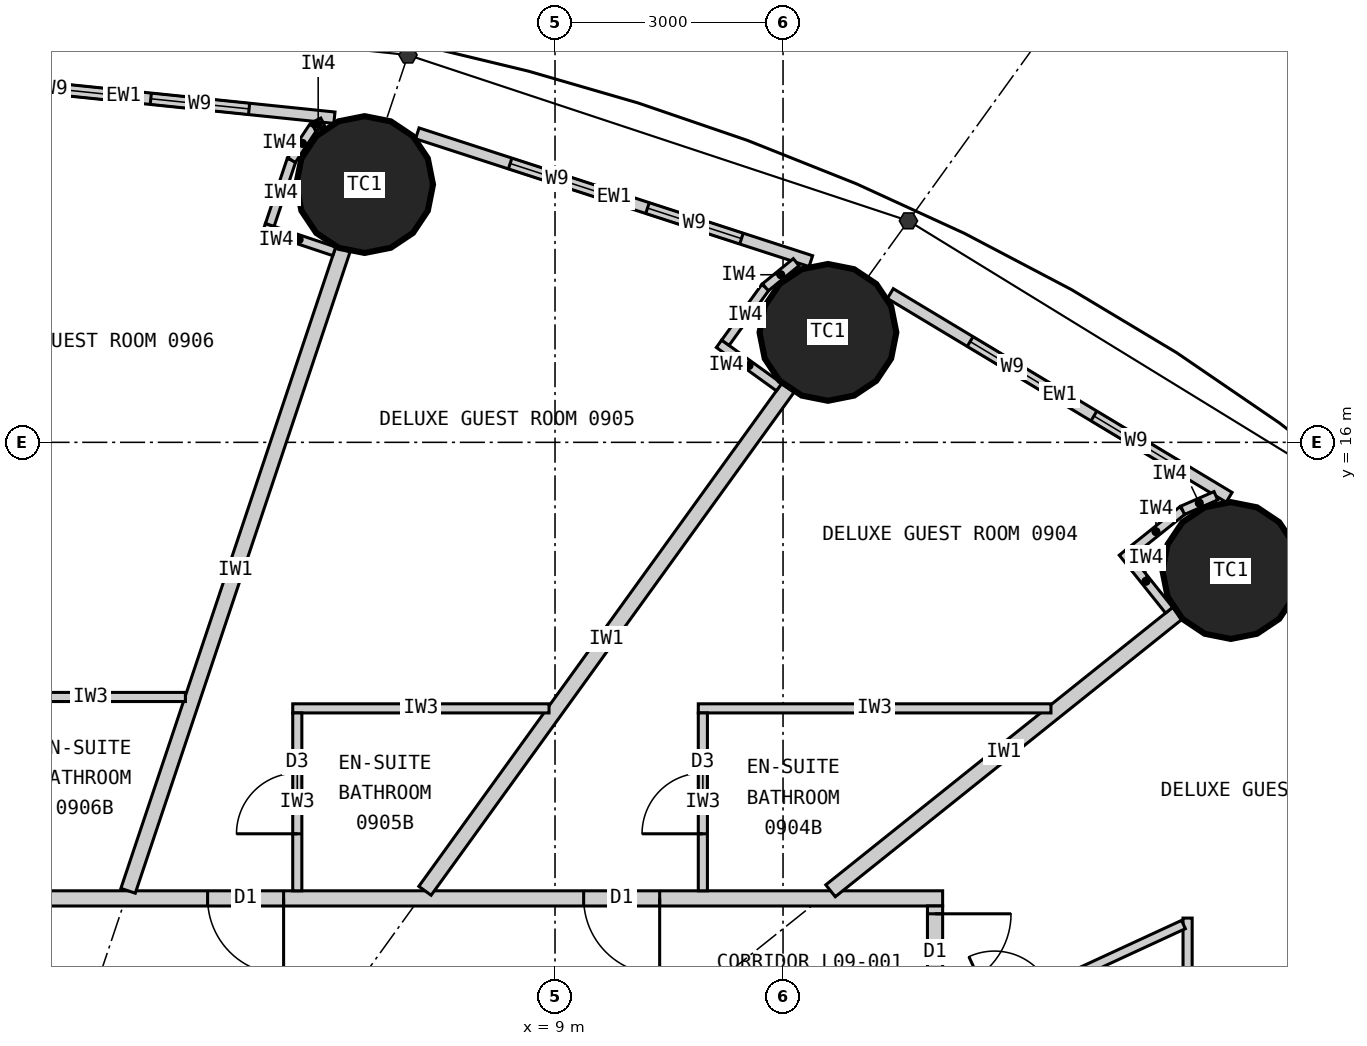
"""IFC4 building model, lengths in metres.
Left out: names, types, materials, properties, quantities, classifications, styles, units other than length and angle.
Written with IfcOpenShell. Run it as: python <this file> out.ifc"""

import sys

from ifc_helpers import new_model, si_unit, direction, frame, frame_2d, origin, origin_2d, place, context, subcontext, project, spatial, rectangle, circle, extrude, element, fill, save


model = new_model("IFC4")
c1 = context("Model", 3, precision=1e-05, world=origin(), true_north=direction((0.0, 1.0)))
c2 = subcontext(c1, "Body", "Model", "MODEL_VIEW")
j1 = project(units=[si_unit("LENGTHUNIT", "METRE"), si_unit("PLANEANGLEUNIT", "RADIAN")], contexts=[c1])
p1 = place(None, origin())
s1 = spatial("IfcSite", under=j1, at=p1, CompositionType="ELEMENT")
p2 = place(p1, origin())
s2 = spatial("IfcBuilding", under=s1, at=p2, CompositionType="ELEMENT")
p3 = place(p2, frame((0.0, 0.0, 42.6)))
s3 = spatial("IfcBuildingStorey", under=s2, at=p3, CompositionType="ELEMENT", Elevation=42.6)
for number, where, z_axis, x_axis in (
    (1, (17.892, 14.313, 0.0), (0.0, 0.0, 1.0), (1.0, 0.0, 0.0)),
    (2, (12.591, 17.447, 0.0), (0.0, 0.0, 1.0), (1.0, 0.0, 0.0)),
    (3, (6.495, 19.391, 0.0), (0.0, 0.0, 1.0), (1.0, 0.0, 0.0)),
):
    element("IfcColumn", number, at=place(p3, frame(where, z_axis=z_axis, x_axis=x_axis)), inside=s3, PredefinedType="COLUMN", context=c2, shape_type="SweptSolid", body=[
        extrude(circle(Radius=0.9, at=origin_2d()), origin(), (0.0, 0.0, 1.0), 3.3),
    ])
p4 = place(p3, frame((17.869, 15.277, 0.0), z_axis=(0.0, 0.0, 1.0), x_axis=(-0.856958191554, 0.515385931054, 0.0)))
e4 = element("IfcWall", 4, at=p4, inside=s3, PredefinedType="ELEMENTEDWALL", context=c2, shape_type="SweptSolid", body=[
    extrude(rectangle(XDim=5.201, YDim=0.15, at=frame_2d((2.601, 0.0))), origin(), (0.0, 0.0, 1.0), 3.05),
])
p5 = place(p4, frame((0.776, 0.0, 0.9)))
e5 = element("IfcOpeningElement", 5, at=p5, cuts=e4, PredefinedType="OPENING", context=c2, shape_type="SweptSolid", body=[
    extrude(rectangle(XDim=1.3, YDim=1.9, at=frame_2d((0.65, 0.95))), frame((0.0, 0.085, 0.0), z_axis=(0.0, -1.0, 0.0), x_axis=(1.0, 0.0, 0.0)), (0.0, 0.0, 1.0), 0.17),
])
p6 = place(p4, frame((2.676, 0.0, 0.9)))
e6 = element("IfcOpeningElement", 6, at=p6, cuts=e4, PredefinedType="OPENING", context=c2, shape_type="SweptSolid", body=[
    extrude(rectangle(XDim=1.3, YDim=1.9, at=frame_2d((0.65, 0.95))), frame((0.0, 0.085, 0.0), z_axis=(0.0, -1.0, 0.0), x_axis=(1.0, 0.0, 0.0)), (0.0, 0.0, 1.0), 0.17),
])
p7 = place(p3, frame((12.366, 18.384, 0.0), z_axis=(0.0, 0.0, 1.0), x_axis=(-0.951138486029, 0.308764603532, 0.0)))
e7 = element("IfcWall", 7, at=p7, inside=s3, PredefinedType="ELEMENTEDWALL", context=c2, shape_type="SweptSolid", body=[
    extrude(rectangle(XDim=5.444, YDim=0.15, at=frame_2d((2.722, 0.0))), origin(), (0.0, 0.0, 1.0), 3.05),
])
p8 = place(p7, frame((0.96, 0.0, 0.9)))
e8 = element("IfcOpeningElement", 8, at=p8, cuts=e7, PredefinedType="OPENING", context=c2, shape_type="SweptSolid", body=[
    extrude(rectangle(XDim=1.3, YDim=1.9, at=frame_2d((0.65, 0.95))), frame((0.0, 0.085, 0.0), z_axis=(0.0, -1.0, 0.0), x_axis=(1.0, 0.0, 0.0)), (0.0, 0.0, 1.0), 0.17),
])
p9 = place(p7, frame((2.86, 0.0, 0.9)))
e9 = element("IfcOpeningElement", 9, at=p9, cuts=e7, PredefinedType="OPENING", context=c2, shape_type="SweptSolid", body=[
    extrude(rectangle(XDim=1.3, YDim=1.9, at=frame_2d((0.65, 0.95))), frame((0.0, 0.085, 0.0), z_axis=(0.0, -1.0, 0.0), x_axis=(1.0, 0.0, 0.0)), (0.0, 0.0, 1.0), 0.17),
])
p10 = place(p3, frame((6.098, 20.271, 0.0), z_axis=(0.0, 0.0, 1.0), x_axis=(-0.994723735084, 0.102589915983, 0.0)))
e10 = element("IfcWall", 10, at=p10, inside=s3, PredefinedType="ELEMENTEDWALL", context=c2, shape_type="SweptSolid", body=[
    extrude(rectangle(XDim=5.576, YDim=0.15, at=frame_2d((2.788, 0.0))), origin(), (0.0, 0.0, 1.0), 3.05),
])
p11 = place(p10, frame((1.129, 0.0, 0.9)))
e11 = element("IfcOpeningElement", 11, at=p11, cuts=e10, PredefinedType="OPENING", context=c2, shape_type="SweptSolid", body=[
    extrude(rectangle(XDim=1.3, YDim=1.9, at=frame_2d((0.65, 0.95))), frame((0.0, 0.085, 0.0), z_axis=(0.0, -1.0, 0.0), x_axis=(1.0, 0.0, 0.0)), (0.0, 0.0, 1.0), 0.17),
])
p12 = place(p10, frame((3.029, 0.0, 0.9)))
e12 = element("IfcOpeningElement", 12, at=p12, cuts=e10, PredefinedType="OPENING", context=c2, shape_type="SweptSolid", body=[
    extrude(rectangle(XDim=1.3, YDim=1.9, at=frame_2d((0.65, 0.95))), frame((0.0, 0.085, 0.0), z_axis=(0.0, -1.0, 0.0), x_axis=(1.0, 0.0, 0.0)), (0.0, 0.0, 1.0), 0.17),
])
p13 = place(p3, frame((-14.1, 10.0, 0.0), z_axis=(0.0, 0.0, 1.0), x_axis=(1.0, 0.0, 0.0)))
e13 = element("IfcWall", 13, at=p13, inside=s3, PredefinedType="PARTITIONING", context=c2, shape_type="SweptSolid", body=[
    extrude(rectangle(XDim=28.2, YDim=0.2, at=frame_2d((14.1, 0.0))), origin(), (0.0, 0.0, 1.0), 3.05),
])
p14 = place(p13, frame((23.477, 0.0, 0.0)))
e14 = element("IfcOpeningElement", 14, at=p14, cuts=e13, PredefinedType="OPENING", context=c2, shape_type="SweptSolid", body=[
    extrude(rectangle(XDim=1.0, YDim=2.2, at=frame_2d((0.5, 1.1))), frame((0.0, 0.11, 0.0), z_axis=(0.0, -1.0, 0.0), x_axis=(1.0, 0.0, 0.0)), (0.0, 0.0, 1.0), 0.22),
])
p15 = place(p13, frame((18.529, 0.0, 0.0)))
e15 = element("IfcOpeningElement", 15, at=p15, cuts=e13, PredefinedType="OPENING", context=c2, shape_type="SweptSolid", body=[
    extrude(rectangle(XDim=1.0, YDim=2.2, at=frame_2d((0.5, 1.1))), frame((0.0, 0.11, 0.0), z_axis=(0.0, -1.0, 0.0), x_axis=(1.0, 0.0, 0.0)), (0.0, 0.0, 1.0), 0.22),
])
p16 = place(p13, frame((14.623, 0.0, 0.0)))
e16 = element("IfcOpeningElement", 16, at=p16, cuts=e13, PredefinedType="OPENING", context=c2, shape_type="SweptSolid", body=[
    extrude(rectangle(XDim=1.0, YDim=2.2, at=frame_2d((0.5, 1.1))), frame((0.0, 0.11, 0.0), z_axis=(0.0, -1.0, 0.0), x_axis=(1.0, 0.0, 0.0)), (0.0, 0.0, 1.0), 0.22),
])
p17 = place(p13, frame((11.252, 0.0, 0.0)))
e17 = element("IfcOpeningElement", 17, at=p17, cuts=e13, PredefinedType="OPENING", context=c2, shape_type="SweptSolid", body=[
    extrude(rectangle(XDim=1.0, YDim=2.1, at=frame_2d((0.5, 1.05))), frame((0.0, 0.11, 0.0), z_axis=(0.0, -1.0, 0.0), x_axis=(1.0, 0.0, 0.0)), (0.0, 0.0, 1.0), 0.22),
])
p18 = place(p13, frame((8.671, 0.0, 0.0)))
e18 = element("IfcOpeningElement", 18, at=p18, cuts=e13, PredefinedType="OPENING", context=c2, shape_type="SweptSolid", body=[
    extrude(rectangle(XDim=1.0, YDim=2.2, at=frame_2d((0.5, 1.1))), frame((0.0, 0.11, 0.0), z_axis=(0.0, -1.0, 0.0), x_axis=(1.0, 0.0, 0.0)), (0.0, 0.0, 1.0), 0.22),
])
p19 = place(p13, frame((1.616, 0.0, 0.0)))
e19 = element("IfcOpeningElement", 19, at=p19, cuts=e13, PredefinedType="OPENING", context=c2, shape_type="SweptSolid", body=[
    extrude(rectangle(XDim=1.0, YDim=2.2, at=frame_2d((0.5, 1.1))), frame((0.0, 0.11, 0.0), z_axis=(0.0, -1.0, 0.0), x_axis=(1.0, 0.0, 0.0)), (0.0, 0.0, 1.0), 0.22),
])
p20 = place(p3, frame((14.0, -9.9, 0.0), z_axis=(0.0, 0.0, 1.0), x_axis=(0.0, 1.0, 0.0)))
e20 = element("IfcWall", 20, at=p20, inside=s3, PredefinedType="PARTITIONING", context=c2, shape_type="SweptSolid", body=[
    extrude(rectangle(XDim=19.8, YDim=0.2, at=frame_2d((9.9, 0.0))), origin(), (0.0, 0.0, 1.0), 3.05),
])
p21 = place(p20, frame((11.698, 0.0, 0.0)))
e21 = element("IfcOpeningElement", 21, at=p21, cuts=e20, PredefinedType="OPENING", context=c2, shape_type="SweptSolid", body=[
    extrude(rectangle(XDim=1.0, YDim=2.2, at=frame_2d((0.5, 1.1))), frame((0.0, 0.11, 0.0), z_axis=(0.0, -1.0, 0.0), x_axis=(1.0, 0.0, 0.0)), (0.0, 0.0, 1.0), 0.22),
])
p22 = place(p20, frame((13.554, 0.0, 0.0)))
e22 = element("IfcOpeningElement", 22, at=p22, cuts=e20, PredefinedType="OPENING", context=c2, shape_type="SweptSolid", body=[
    extrude(rectangle(XDim=1.0, YDim=2.0, at=frame_2d((0.5, 1.0))), frame((0.0, 0.11, 0.0), z_axis=(0.0, -1.0, 0.0), x_axis=(1.0, 0.0, 0.0)), (0.0, 0.0, 1.0), 0.22),
])
p23 = place(p20, frame((18.698, 0.0, 0.0)))
e23 = element("IfcOpeningElement", 23, at=p23, cuts=e20, PredefinedType="OPENING", context=c2, shape_type="SweptSolid", body=[
    extrude(rectangle(XDim=1.0, YDim=2.2, at=frame_2d((0.5, 1.1))), frame((0.0, 0.11, 0.0), z_axis=(0.0, -1.0, 0.0), x_axis=(1.0, 0.0, 0.0)), (0.0, 0.0, 1.0), 0.22),
])
p24 = place(p20, frame((0.975, 0.0, 0.0)))
e24 = element("IfcOpeningElement", 24, at=p24, cuts=e20, PredefinedType="OPENING", context=c2, shape_type="SweptSolid", body=[
    extrude(rectangle(XDim=1.0, YDim=2.2, at=frame_2d((0.5, 1.1))), frame((0.0, 0.11, 0.0), z_axis=(0.0, -1.0, 0.0), x_axis=(1.0, 0.0, 0.0)), (0.0, 0.0, 1.0), 0.22),
])
p25 = place(p20, frame((7.097, 0.0, 0.0)))
e25 = element("IfcOpeningElement", 25, at=p25, cuts=e20, PredefinedType="OPENING", context=c2, shape_type="SweptSolid", body=[
    extrude(rectangle(XDim=1.0, YDim=2.2, at=frame_2d((0.5, 1.1))), frame((0.0, 0.11, 0.0), z_axis=(0.0, -1.0, 0.0), x_axis=(1.0, 0.0, 0.0)), (0.0, 0.0, 1.0), 0.22),
])
p26 = place(p3, frame((14.1, 6.512, 0.0), z_axis=(0.0, 0.0, 1.0), x_axis=(0.907842433118, 0.41931147925, 0.0)))
e26 = element("IfcWall", 26, at=p26, inside=s3, PredefinedType="PARTITIONING", context=c2, shape_type="SweptSolid", body=[
    extrude(rectangle(XDim=7.823, YDim=0.2, at=frame_2d((3.912, 0.0))), origin(), (0.0, 0.0, 1.0), 2.15),
])
p27 = place(p3, frame((12.625, 10.1, 0.0), z_axis=(0.0, 0.0, 1.0), x_axis=(0.780872884676, 0.624689953479, 0.0)))
e27 = element("IfcWall", 27, at=p27, inside=s3, PredefinedType="PARTITIONING", context=c2, shape_type="SweptSolid", body=[
    extrude(rectangle(XDim=5.845, YDim=0.2, at=frame_2d((2.922, 0.0))), origin(), (0.0, 0.0, 1.0), 2.15),
])
p28 = place(p3, frame((7.289, 10.1, 0.0), z_axis=(0.0, 0.0, 1.0), x_axis=(0.585216319319, 0.810877216108, 0.0)))
e28 = element("IfcWall", 28, at=p28, inside=s3, PredefinedType="PARTITIONING", context=c2, shape_type="SweptSolid", body=[
    extrude(rectangle(XDim=8.16, YDim=0.2, at=frame_2d((4.08, 0.0))), origin(), (0.0, 0.0, 1.0), 2.15),
])
p29 = place(p3, frame((3.383, 10.1, 0.0), z_axis=(0.0, 0.0, 1.0), x_axis=(0.317593727596, 0.948226884344, 0.0)))
e29 = element("IfcWall", 29, at=p29, inside=s3, PredefinedType="PARTITIONING", context=c2, shape_type="SweptSolid", body=[
    extrude(rectangle(XDim=8.899, YDim=0.2, at=frame_2d((4.449, 0.0))), origin(), (0.0, 0.0, 1.0), 2.15),
])
p30 = place(p3, frame((17.323, 8.101, 0.0), z_axis=(0.0, 0.0, 1.0), x_axis=(0.0, 1.0, 0.0)))
e30 = element("IfcWall", 30, at=p30, inside=s3, PredefinedType="PARTITIONING", context=c2, shape_type="SweptSolid", body=[
    extrude(rectangle(XDim=1.64, YDim=0.12, at=frame_2d((0.82, 0.0))), origin(), (0.0, 0.0, 1.0), 3.05),
])
p31 = place(p3, frame((14.1, 8.193, 0.0), z_axis=(0.0, 0.0, 1.0), x_axis=(0.907836493557, 0.419324338628, 0.0)))
e31 = element("IfcWall", 31, at=p31, inside=s3, PredefinedType="PARTITIONING", context=c2, shape_type="SweptSolid", body=[
    extrude(rectangle(XDim=3.49, YDim=0.12, at=frame_2d((1.745, 0.0))), origin(), (0.0, 0.0, 1.0), 3.05),
])
p32 = place(p31, frame((0.75, 0.0, 0.0)))
e32 = element("IfcOpeningElement", 32, at=p32, cuts=e31, PredefinedType="OPENING", context=c2, shape_type="SweptSolid", body=[
    extrude(rectangle(XDim=0.8, YDim=2.1, at=frame_2d((0.4, 1.05))), frame((0.0, 0.07, 0.0), z_axis=(0.0, -1.0, 0.0), x_axis=(1.0, 0.0, 0.0)), (0.0, 0.0, 1.0), 0.14),
])
p33 = place(p3, frame((15.525, 12.5, 0.0), z_axis=(0.0, 0.0, 1.0), x_axis=(-1.0, 0.0, 0.0)))
e33 = element("IfcWall", 33, at=p33, inside=s3, PredefinedType="PARTITIONING", context=c2, shape_type="SweptSolid", body=[
    extrude(rectangle(XDim=4.64, YDim=0.12, at=frame_2d((2.32, 0.0))), origin(), (0.0, 0.0, 1.0), 3.05),
])
p34 = place(p3, frame((10.945, 10.1, 0.0), z_axis=(0.0, 0.0, 1.0), x_axis=(0.0, 1.0, 0.0)))
e34 = element("IfcWall", 34, at=p34, inside=s3, PredefinedType="PARTITIONING", context=c2, shape_type="SweptSolid", body=[
    extrude(rectangle(XDim=2.34, YDim=0.12, at=frame_2d((1.17, 0.0))), origin(), (0.0, 0.0, 1.0), 3.05),
])
p35 = place(p34, frame((0.75, 0.0, 0.0)))
e35 = element("IfcOpeningElement", 35, at=p35, cuts=e34, PredefinedType="OPENING", context=c2, shape_type="SweptSolid", body=[
    extrude(rectangle(XDim=0.8, YDim=2.1, at=frame_2d((0.4, 1.05))), frame((0.0, 0.07, 0.0), z_axis=(0.0, -1.0, 0.0), x_axis=(1.0, 0.0, 0.0)), (0.0, 0.0, 1.0), 0.14),
])
p36 = place(p3, frame((8.921, 12.5, 0.0), z_axis=(0.0, 0.0, 1.0), x_axis=(-1.0, 0.0, 0.0)))
e36 = element("IfcWall", 36, at=p36, inside=s3, PredefinedType="PARTITIONING", context=c2, shape_type="SweptSolid", body=[
    extrude(rectangle(XDim=3.372, YDim=0.12, at=frame_2d((1.686, 0.0))), origin(), (0.0, 0.0, 1.0), 3.05),
])
p37 = place(p3, frame((5.609, 10.1, 0.0), z_axis=(0.0, 0.0, 1.0), x_axis=(0.0, 1.0, 0.0)))
e37 = element("IfcWall", 37, at=p37, inside=s3, PredefinedType="PARTITIONING", context=c2, shape_type="SweptSolid", body=[
    extrude(rectangle(XDim=2.34, YDim=0.12, at=frame_2d((1.17, 0.0))), origin(), (0.0, 0.0, 1.0), 3.05),
])
p38 = place(p37, frame((0.75, 0.0, 0.0)))
e38 = element("IfcOpeningElement", 38, at=p38, cuts=e37, PredefinedType="OPENING", context=c2, shape_type="SweptSolid", body=[
    extrude(rectangle(XDim=0.8, YDim=2.1, at=frame_2d((0.4, 1.05))), frame((0.0, 0.07, 0.0), z_axis=(0.0, -1.0, 0.0), x_axis=(1.0, 0.0, 0.0)), (0.0, 0.0, 1.0), 0.14),
])
p39 = place(p3, frame((4.137, 12.65, 0.0), z_axis=(0.0, 0.0, 1.0), x_axis=(-1.0, 0.0, 0.0)))
e39 = element("IfcWall", 39, at=p39, inside=s3, PredefinedType="PARTITIONING", context=c2, shape_type="SweptSolid", body=[
    extrude(rectangle(XDim=2.494, YDim=0.12, at=frame_2d((1.247, 0.0))), origin(), (0.0, 0.0, 1.0), 3.05),
])
p40 = place(p3, frame((17.08, 13.792, 0.0), z_axis=(0.0, 0.0, 1.0), x_axis=(-0.624756144097, 0.780819928289, 0.0)))
e40 = element("IfcWall", 40, at=p40, inside=s3, PredefinedType="PARTITIONING", context=c2, shape_type="SweptSolid", body=[
    extrude(rectangle(XDim=0.975, YDim=0.12, at=frame_2d((0.487, 0.0))), origin(), (0.0, 0.0, 1.0), 3.05),
])
p41 = place(p3, frame((16.555, 14.543, 0.0), z_axis=(0.0, 0.0, 1.0), x_axis=(0.780789399477, 0.62479429708, 0.0)))
e41 = element("IfcWall", 41, at=p41, inside=s3, PredefinedType="PARTITIONING", context=c2, shape_type="SweptSolid", body=[
    extrude(rectangle(XDim=0.9, YDim=0.12, at=frame_2d((0.45, 0.0))), origin(), (0.0, 0.0, 1.0), 3.05),
])
p42 = place(p3, frame((17.258, 15.106, 0.0), z_axis=(0.0, 0.0, 1.0), x_axis=(0.916098562583, 0.400953143937, 0.0)))
e42 = element("IfcWall", 42, at=p42, inside=s3, PredefinedType="PARTITIONING", context=c2, shape_type="SweptSolid", body=[
    extrude(rectangle(XDim=0.477, YDim=0.12, at=frame_2d((0.238, 0.0))), origin(), (0.0, 0.0, 1.0), 3.05),
])
p43 = place(p3, frame((11.948, 16.727, 0.0), z_axis=(0.0, 0.0, 1.0), x_axis=(-0.810897160646, 0.585188683123, 0.0)))
e43 = element("IfcWall", 43, at=p43, inside=s3, PredefinedType="PARTITIONING", context=c2, shape_type="SweptSolid", body=[
    extrude(rectangle(XDim=0.975, YDim=0.12, at=frame_2d((0.487, 0.0))), origin(), (0.0, 0.0, 1.0), 3.05),
])
p44 = place(p3, frame((11.241, 17.31, 0.0), z_axis=(0.0, 0.0, 1.0), x_axis=(0.585054732094, 0.810993810367, 0.0)))
e44 = element("IfcWall", 44, at=p44, inside=s3, PredefinedType="PARTITIONING", context=c2, shape_type="SweptSolid", body=[
    extrude(rectangle(XDim=0.9, YDim=0.12, at=frame_2d((0.45, 0.0))), origin(), (0.0, 0.0, 1.0), 3.05),
])
p45 = place(p3, frame((11.768, 18.04, 0.0), z_axis=(0.0, 0.0, 1.0), x_axis=(0.775268927517, 0.631631292787, 0.0)))
e45 = element("IfcWall", 45, at=p45, inside=s3, PredefinedType="PARTITIONING", context=c2, shape_type="SweptSolid", body=[
    extrude(rectangle(XDim=0.522, YDim=0.12, at=frame_2d((0.261, 0.0))), origin(), (0.0, 0.0, 1.0), 3.05),
])
p46 = place(p3, frame((6.095, 18.513, 0.0), z_axis=(0.0, 0.0, 1.0), x_axis=(-0.948281677008, 0.317430088446, 0.0)))
e46 = element("IfcWall", 46, at=p46, inside=s3, PredefinedType="PARTITIONING", context=c2, shape_type="SweptSolid", body=[
    extrude(rectangle(XDim=0.974, YDim=0.12, at=frame_2d((0.487, 0.0))), origin(), (0.0, 0.0, 1.0), 3.05),
])
p47 = place(p3, frame((5.247, 18.86, 0.0), z_axis=(0.0, 0.0, 1.0), x_axis=(0.317610704489, 0.94822119803, 0.0)))
e47 = element("IfcWall", 47, at=p47, inside=s3, PredefinedType="PARTITIONING", context=c2, shape_type="SweptSolid", body=[
    extrude(rectangle(XDim=0.9, YDim=0.12, at=frame_2d((0.45, 0.0))), origin(), (0.0, 0.0, 1.0), 3.05),
])
p48 = place(p3, frame((5.533, 19.714, 0.0), z_axis=(0.0, 0.0, 1.0), x_axis=(0.552014331743, 0.833834622422, 0.0)))
e48 = element("IfcWall", 48, at=p48, inside=s3, PredefinedType="PARTITIONING", context=c2, shape_type="SweptSolid", body=[
    extrude(rectangle(XDim=0.525, YDim=0.12, at=frame_2d((0.262, 0.0))), origin(), (0.0, 0.0, 1.0), 3.05),
])
p49 = place(p3, frame((5.823, 20.151, 0.0), z_axis=(0.0, 0.0, 1.0), x_axis=(0.894784104941, 0.446499054362, 0.0)))
e49 = element("IfcWall", 49, at=p49, inside=s3, PredefinedType="PARTITIONING", context=c2, shape_type="SweptSolid", body=[
    extrude(rectangle(XDim=0.137, YDim=0.12, at=frame_2d((0.068, 0.0))), origin(), (0.0, 0.0, 1.0), 3.05),
])
p50 = place(p5, origin())
e50 = element("IfcWindow", 50, at=p50, inside=s3, PartitioningType="SINGLE_PANEL", PredefinedType="WINDOW", context=c2, shape_type="SweptSolid", body=[
    extrude(rectangle(XDim=1.3, YDim=1.9, at=frame_2d((0.65, 0.95))), frame((0.0, 0.03, 0.0), z_axis=(0.0, -1.0, 0.0), x_axis=(1.0, 0.0, 0.0)), (0.0, 0.0, 1.0), 0.06),
])
fill(e5, e50)
p51 = place(p6, origin())
e51 = element("IfcWindow", 51, at=p51, inside=s3, PartitioningType="SINGLE_PANEL", PredefinedType="WINDOW", context=c2, shape_type="SweptSolid", body=[
    extrude(rectangle(XDim=1.3, YDim=1.9, at=frame_2d((0.65, 0.95))), frame((0.0, 0.03, 0.0), z_axis=(0.0, -1.0, 0.0), x_axis=(1.0, 0.0, 0.0)), (0.0, 0.0, 1.0), 0.06),
])
fill(e6, e51)
p52 = place(p8, origin())
e52 = element("IfcWindow", 52, at=p52, inside=s3, PartitioningType="SINGLE_PANEL", PredefinedType="WINDOW", context=c2, shape_type="SweptSolid", body=[
    extrude(rectangle(XDim=1.3, YDim=1.9, at=frame_2d((0.65, 0.95))), frame((0.0, 0.03, 0.0), z_axis=(0.0, -1.0, 0.0), x_axis=(1.0, 0.0, 0.0)), (0.0, 0.0, 1.0), 0.06),
])
fill(e8, e52)
p53 = place(p9, origin())
e53 = element("IfcWindow", 53, at=p53, inside=s3, PartitioningType="SINGLE_PANEL", PredefinedType="WINDOW", context=c2, shape_type="SweptSolid", body=[
    extrude(rectangle(XDim=1.3, YDim=1.9, at=frame_2d((0.65, 0.95))), frame((0.0, 0.03, 0.0), z_axis=(0.0, -1.0, 0.0), x_axis=(1.0, 0.0, 0.0)), (0.0, 0.0, 1.0), 0.06),
])
fill(e9, e53)
p54 = place(p11, origin())
e54 = element("IfcWindow", 54, at=p54, inside=s3, PartitioningType="SINGLE_PANEL", PredefinedType="WINDOW", context=c2, shape_type="SweptSolid", body=[
    extrude(rectangle(XDim=1.3, YDim=1.9, at=frame_2d((0.65, 0.95))), frame((0.0, 0.03, 0.0), z_axis=(0.0, -1.0, 0.0), x_axis=(1.0, 0.0, 0.0)), (0.0, 0.0, 1.0), 0.06),
])
fill(e11, e54)
p55 = place(p12, origin())
e55 = element("IfcWindow", 55, at=p55, inside=s3, PartitioningType="SINGLE_PANEL", PredefinedType="WINDOW", context=c2, shape_type="SweptSolid", body=[
    extrude(rectangle(XDim=1.3, YDim=1.9, at=frame_2d((0.65, 0.95))), frame((0.0, 0.03, 0.0), z_axis=(0.0, -1.0, 0.0), x_axis=(1.0, 0.0, 0.0)), (0.0, 0.0, 1.0), 0.06),
])
fill(e12, e55)
p56 = place(p23, origin())
e56 = element("IfcDoor", 56, at=p56, inside=s3, OperationType="SINGLE_SWING_RIGHT", PredefinedType="DOOR", context=c2, shape_type="SweptSolid", body=[
    extrude(rectangle(XDim=1.0, YDim=2.2, at=frame_2d((0.5, 1.1))), frame((0.0, 0.025, 0.0), z_axis=(0.0, -1.0, 0.0), x_axis=(1.0, 0.0, 0.0)), (0.0, 0.0, 1.0), 0.05),
])
fill(e23, e56)
p57 = place(p35, origin())
e57 = element("IfcDoor", 57, at=p57, inside=s3, OperationType="SINGLE_SWING_LEFT", PredefinedType="DOOR", context=c2, shape_type="SweptSolid", body=[
    extrude(rectangle(XDim=0.8, YDim=2.1, at=frame_2d((0.4, 1.05))), frame((0.0, 0.025, 0.0), z_axis=(0.0, -1.0, 0.0), x_axis=(1.0, 0.0, 0.0)), (0.0, 0.0, 1.0), 0.05),
])
fill(e35, e57)
p58 = place(p14, origin())
e58 = element("IfcDoor", 58, at=p58, inside=s3, OperationType="SINGLE_SWING_RIGHT", PredefinedType="DOOR", context=c2, shape_type="SweptSolid", body=[
    extrude(rectangle(XDim=1.0, YDim=2.2, at=frame_2d((0.5, 1.1))), frame((0.0, 0.025, 0.0), z_axis=(0.0, -1.0, 0.0), x_axis=(1.0, 0.0, 0.0)), (0.0, 0.0, 1.0), 0.05),
])
fill(e14, e58)
p59 = place(p38, origin())
e59 = element("IfcDoor", 59, at=p59, inside=s3, OperationType="SINGLE_SWING_LEFT", PredefinedType="DOOR", context=c2, shape_type="SweptSolid", body=[
    extrude(rectangle(XDim=0.8, YDim=2.1, at=frame_2d((0.4, 1.05))), frame((0.0, 0.025, 0.0), z_axis=(0.0, -1.0, 0.0), x_axis=(1.0, 0.0, 0.0)), (0.0, 0.0, 1.0), 0.05),
])
fill(e38, e59)
p60 = place(p15, origin())
e60 = element("IfcDoor", 60, at=p60, inside=s3, OperationType="SINGLE_SWING_RIGHT", PredefinedType="DOOR", context=c2, shape_type="SweptSolid", body=[
    extrude(rectangle(XDim=1.0, YDim=2.2, at=frame_2d((0.5, 1.1))), frame((0.0, 0.025, 0.0), z_axis=(0.0, -1.0, 0.0), x_axis=(1.0, 0.0, 0.0)), (0.0, 0.0, 1.0), 0.05),
])
fill(e15, e60)
save(model, sys.argv[1])
